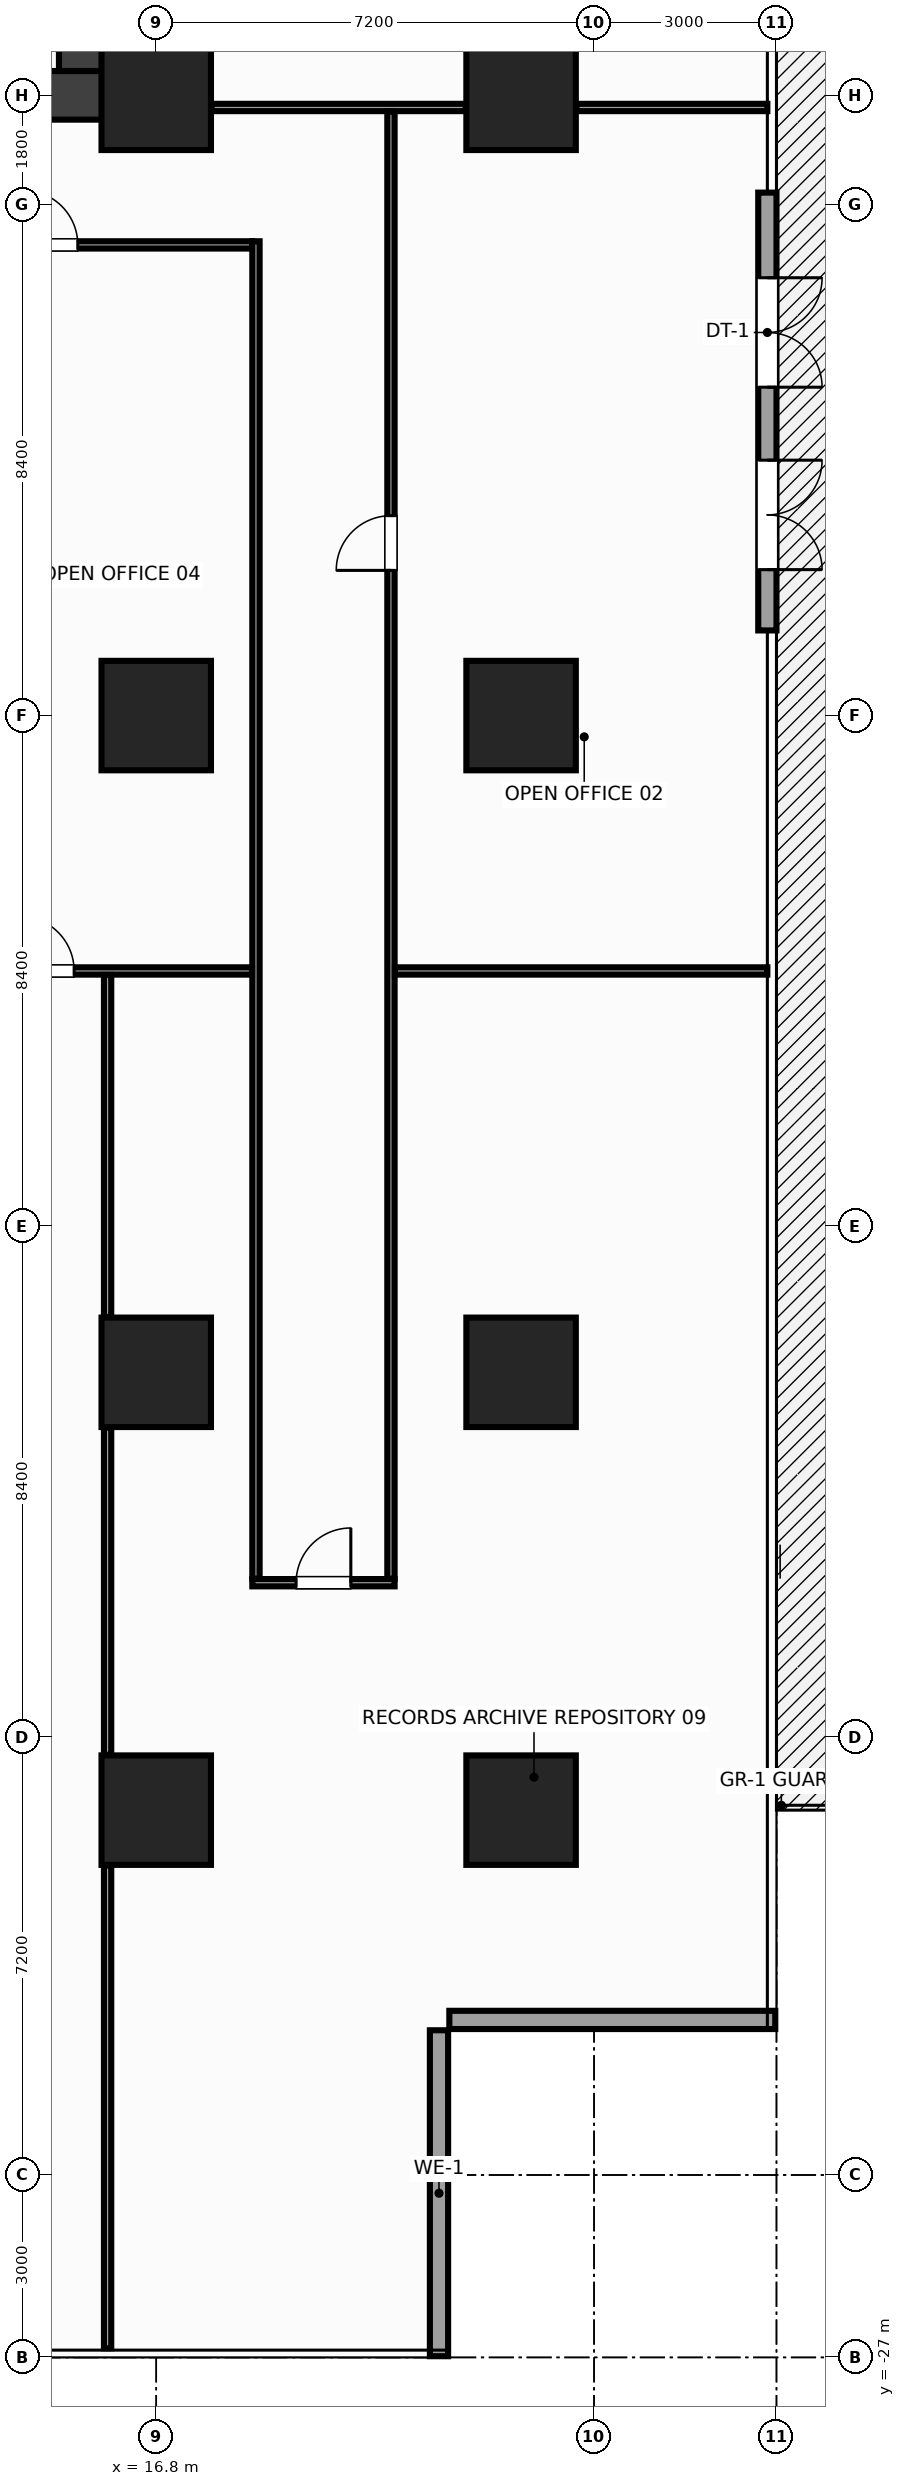
"""IFC4 building model, lengths in metres.
Left out: names, types, materials, properties, quantities, classifications, styles, units other than length and angle.
Written with IfcOpenShell. Run it as: python <this file> out.ifc"""

import sys

from ifc_helpers import new_model, si_unit, direction, frame, frame_2d, origin, origin_2d, place, context, subcontext, project, spatial, rectangle, extrude, source, transform, mapped, element, fill, save


model = new_model("IFC4")
c1 = context("Model", 3, precision=1e-05, world=origin(), true_north=direction((0.0, 1.0)))
c2 = subcontext(c1, "Body", "Model", "MODEL_VIEW")
j1 = project(units=[si_unit("LENGTHUNIT", "METRE"), si_unit("PLANEANGLEUNIT", "RADIAN")], contexts=[c1])
p1 = place(None, origin())
s1 = spatial("IfcSite", under=j1, at=p1, CompositionType="ELEMENT")
p2 = place(p1, origin())
s2 = spatial("IfcBuilding", under=s1, at=p2, CompositionType="ELEMENT")
p3 = place(p2, frame((0.0, 0.0, 23.6)))
s3 = spatial("IfcBuildingStorey", under=s2, at=p3, CompositionType="ELEMENT", Elevation=23.6)
m1 = source(origin(), c2, "Body", "SweptSolid", [
    extrude(rectangle(XDim=32.0, YDim=0.8, at=frame_2d((16.0, 0.0))), origin(), (0.0, 0.0, 1.0), 3.6),
])
p4 = place(p3, frame((-16.0, 10.2, 0.0), z_axis=(0.0, 0.0, 1.0), x_axis=(1.0, 0.0, 0.0)))
e1 = element("IfcWall", 1, at=p4, inside=s3, PredefinedType="SHEAR", context=c2, shape_type="MappedRepresentation", body=[
    mapped(m1, transform((0.0, 0.0, 0.0), x_axis=(1.0, 0.0, 0.0), y_axis=(0.0, 1.0, 0.0), z_axis=(0.0, 0.0, 1.0), scale=1.0)),
])
p5 = place(p4, frame((1.85, 0.0, 0.0)))
e2 = element("IfcOpeningElement", 2, at=p5, cuts=e1, PredefinedType="OPENING", context=c2, shape_type="SweptSolid", body=[
    extrude(rectangle(XDim=1.6, YDim=2.15, at=frame_2d((0.8, 1.075))), frame((0.0, 0.412, 0.0), z_axis=(0.0, -1.0, 0.0), x_axis=(1.0, 0.0, 0.0)), (0.0, 0.0, 1.0), 0.824),
])
p6 = place(p4, frame((28.55, 0.0, 0.0)))
e3 = element("IfcOpeningElement", 3, at=p6, cuts=e1, PredefinedType="OPENING", context=c2, shape_type="SweptSolid", body=[
    extrude(rectangle(XDim=1.6, YDim=2.15, at=frame_2d((0.8, 1.075))), frame((0.0, 0.412, 0.0), z_axis=(0.0, -1.0, 0.0), x_axis=(1.0, 0.0, 0.0)), (0.0, 0.0, 1.0), 0.824),
])
p7 = place(p4, frame((15.25, 0.0, 0.0)))
e4 = element("IfcOpeningElement", 4, at=p7, cuts=e1, PredefinedType="OPENING", context=c2, shape_type="SweptSolid", body=[
    extrude(rectangle(XDim=1.5, YDim=2.2, at=frame_2d((0.75, 1.1))), frame((0.0, 0.412, 0.0), z_axis=(0.0, -1.0, 0.0), x_axis=(1.0, 0.0, 0.0)), (0.0, 0.0, 1.0), 0.824),
])
m2 = source(origin(), c2, "Body", "SweptSolid", [
    extrude(rectangle(XDim=12.8, YDim=0.8, at=frame_2d((6.4, 0.0))), origin(), (0.0, 0.0, 1.0), 3.6),
])
p8 = place(p3, frame((15.6, 10.6, 0.0), z_axis=(0.0, 0.0, 1.0), x_axis=(0.0, 1.0, 0.0)))
e5 = element("IfcWall", 5, at=p8, inside=s3, PredefinedType="SHEAR", context=c2, shape_type="MappedRepresentation", body=[
    mapped(m2, transform((0.0, 0.0, 0.0), x_axis=(1.0, 0.0, 0.0), y_axis=(0.0, 1.0, 0.0), z_axis=(0.0, 0.0, 1.0), scale=1.0)),
])
m3 = source(origin(), c2, "Body", "SweptSolid", [
    extrude(rectangle(XDim=1.8, YDim=1.8, at=origin_2d()), origin(), (0.0, 0.0, 1.0), 3.6),
])
for number, where, z_axis, x_axis in (
    (6, (16.8, -18.0, 0.0), (0.0, 0.0, 1.0), (1.0, 0.0, 0.0)),
    (7, (16.8, -10.8, 0.0), (0.0, 0.0, 1.0), (1.0, 0.0, 0.0)),
    (8, (16.8, 0.0, 0.0), (0.0, 0.0, 1.0), (1.0, 0.0, 0.0)),
    (9, (16.8, 10.2, 0.0), (0.0, 0.0, 1.0), (1.0, 0.0, 0.0)),
    (10, (22.8, -18.0, 0.0), (0.0, 0.0, 1.0), (1.0, 0.0, 0.0)),
    (11, (22.8, -10.8, 0.0), (0.0, 0.0, 1.0), (1.0, 0.0, 0.0)),
    (12, (22.8, 0.0, 0.0), (0.0, 0.0, 1.0), (1.0, 0.0, 0.0)),
    (13, (22.8, 10.2, 0.0), (0.0, 0.0, 1.0), (1.0, 0.0, 0.0)),
):
    element("IfcColumn", number, at=place(p3, frame(where, z_axis=z_axis, x_axis=x_axis)), inside=s3, PredefinedType="COLUMN", context=c2, shape_type="MappedRepresentation", body=[
        mapped(m3, transform((0.0, 0.0, 0.0), x_axis=(1.0, 0.0, 0.0), y_axis=(0.0, 1.0, 0.0), z_axis=(0.0, 0.0, 1.0), scale=1.0)),
    ])
m4 = source(origin(), c2, "Body", "SweptSolid", [
    extrude(rectangle(XDim=5.36, YDim=0.3, at=frame_2d((2.68, 0.0))), origin(), (0.0, 0.0, 1.0), 2.74),
])
for number, where, z_axis, x_axis in (
    (14, (21.45, -26.98, 0.0), (0.0, 0.0, 1.0), (0.0, 1.0, 0.0)),
    (15, (21.62, -21.45, 0.0), (0.0, 0.0, 1.0), (1.0, 0.0, 0.0)),
):
    element("IfcWall", number, at=place(p3, frame(where, z_axis=z_axis, x_axis=x_axis)), inside=s3, PredefinedType="STANDARD", context=c2, shape_type="MappedRepresentation", body=[
        mapped(m4, transform((0.0, 0.0, 0.0), x_axis=(1.0, 0.0, 0.0), y_axis=(0.0, 1.0, 0.0), z_axis=(0.0, 0.0, 1.0), scale=1.0)),
    ])
m5 = source(origin(), c2, "Body", "SweptSolid", [
    extrude(rectangle(XDim=7.2, YDim=0.3, at=frame_2d((3.6, 0.0))), origin(), (0.0, 0.0, 1.0), 2.74),
])
p9 = place(p3, frame((26.85, 8.6, 0.0), z_axis=(0.0, 0.0, 1.0), x_axis=(0.0, -1.0, 0.0)))
e16 = element("IfcWall", 16, at=p9, inside=s3, PredefinedType="STANDARD", context=c2, shape_type="MappedRepresentation", body=[
    mapped(m5, transform((0.0, 0.0, 0.0), x_axis=(1.0, 0.0, 0.0), y_axis=(0.0, 1.0, 0.0), z_axis=(0.0, 0.0, 1.0), scale=1.0)),
])
p10 = place(p9, frame((1.4, 0.0, 0.0)))
e17 = element("IfcOpeningElement", 17, at=p10, cuts=e16, PredefinedType="OPENING", context=c2, shape_type="SweptSolid", body=[
    extrude(rectangle(XDim=1.8, YDim=2.2, at=frame_2d((0.9, 1.1))), frame((0.0, 0.162, 0.0), z_axis=(0.0, -1.0, 0.0), x_axis=(1.0, 0.0, 0.0)), (0.0, 0.0, 1.0), 0.324),
])
p11 = place(p9, frame((4.4, 0.0, 0.0)))
e18 = element("IfcOpeningElement", 18, at=p11, cuts=e16, PredefinedType="OPENING", context=c2, shape_type="SweptSolid", body=[
    extrude(rectangle(XDim=1.8, YDim=2.2, at=frame_2d((0.9, 1.1))), frame((0.0, 0.162, 0.0), z_axis=(0.0, -1.0, 0.0), x_axis=(1.0, 0.0, 0.0)), (0.0, 0.0, 1.0), 0.324),
])
m6 = source(origin(), c2, "Body", "SweptSolid", [
    extrude(rectangle(XDim=4.18, YDim=0.12, at=frame_2d((2.09, 0.0))), origin(), (0.0, 0.0, 1.0), 2.745),
])
p12 = place(p3, frame((17.71, 10.0, 0.0), z_axis=(0.0, 0.0, 1.0), x_axis=(1.0, 0.0, 0.0)))
e19 = element("IfcWall", 19, at=p12, inside=s3, PredefinedType="PARTITIONING", context=c2, shape_type="MappedRepresentation", body=[
    mapped(m6, transform((0.0, 0.0, 0.0), x_axis=(1.0, 0.0, 0.0), y_axis=(0.0, 1.0, 0.0), z_axis=(0.0, 0.0, 1.0), scale=1.0)),
])
m7 = source(origin(), c2, "Body", "SweptSolid", [
    extrude(rectangle(XDim=3.14, YDim=0.12, at=frame_2d((1.57, 0.0))), origin(), (0.0, 0.0, 1.0), 2.435),
])
p13 = place(p3, frame((23.71, 10.0, 0.0), z_axis=(0.0, 0.0, 1.0), x_axis=(1.0, 0.0, 0.0)))
e20 = element("IfcWall", 20, at=p13, inside=s3, PredefinedType="PARTITIONING", context=c2, shape_type="MappedRepresentation", body=[
    mapped(m7, transform((0.0, 0.0, 0.0), x_axis=(1.0, 0.0, 0.0), y_axis=(0.0, 1.0, 0.0), z_axis=(0.0, 0.0, 1.0), scale=1.0)),
])
m8 = source(origin(), c2, "Body", "SweptSolid", [
    extrude(rectangle(XDim=36.76, YDim=0.12, at=frame_2d((18.38, 0.0))), origin(), (0.0, 0.0, 1.0), 2.745),
])
p14 = place(p3, frame((-18.38, 7.74, 0.0), z_axis=(0.0, 0.0, 1.0), x_axis=(1.0, 0.0, 0.0)))
e21 = element("IfcWall", 21, at=p14, inside=s3, PredefinedType="PARTITIONING", context=c2, shape_type="MappedRepresentation", body=[
    mapped(m8, transform((0.0, 0.0, 0.0), x_axis=(1.0, 0.0, 0.0), y_axis=(0.0, 1.0, 0.0), z_axis=(0.0, 0.0, 1.0), scale=1.0)),
])
p15 = place(p14, frame((2.79, 0.0, 0.0)))
e22 = element("IfcOpeningElement", 22, at=p15, cuts=e21, PredefinedType="OPENING", context=c2, shape_type="SweptSolid", body=[
    extrude(rectangle(XDim=0.9, YDim=2.15, at=frame_2d((0.45, 1.075))), frame((0.0, 0.072, 0.0), z_axis=(0.0, -1.0, 0.0), x_axis=(1.0, 0.0, 0.0)), (0.0, 0.0, 1.0), 0.144),
])
p16 = place(p14, frame((32.99, 0.0, 0.0)))
e23 = element("IfcOpeningElement", 23, at=p16, cuts=e21, PredefinedType="OPENING", context=c2, shape_type="SweptSolid", body=[
    extrude(rectangle(XDim=0.9, YDim=2.15, at=frame_2d((0.45, 1.075))), frame((0.0, 0.072, 0.0), z_axis=(0.0, -1.0, 0.0), x_axis=(1.0, 0.0, 0.0)), (0.0, 0.0, 1.0), 0.144),
])
p17 = place(p14, frame((9.93, 0.0, 0.0)))
e24 = element("IfcOpeningElement", 24, at=p17, cuts=e21, PredefinedType="OPENING", context=c2, shape_type="SweptSolid", body=[
    extrude(rectangle(XDim=0.9, YDim=2.15, at=frame_2d((0.45, 1.075))), frame((0.0, 0.072, 0.0), z_axis=(0.0, -1.0, 0.0), x_axis=(1.0, 0.0, 0.0)), (0.0, 0.0, 1.0), 0.144),
])
p18 = place(p14, frame((18.23, 0.0, 0.0)))
e25 = element("IfcOpeningElement", 25, at=p18, cuts=e21, PredefinedType="OPENING", context=c2, shape_type="SweptSolid", body=[
    extrude(rectangle(XDim=0.9, YDim=2.15, at=frame_2d((0.45, 1.075))), frame((0.0, 0.072, 0.0), z_axis=(0.0, -1.0, 0.0), x_axis=(1.0, 0.0, 0.0)), (0.0, 0.0, 1.0), 0.144),
])
p19 = place(p14, frame((27.03, 0.0, 0.0)))
e26 = element("IfcOpeningElement", 26, at=p19, cuts=e21, PredefinedType="OPENING", context=c2, shape_type="SweptSolid", body=[
    extrude(rectangle(XDim=0.9, YDim=2.15, at=frame_2d((0.45, 1.075))), frame((0.0, 0.072, 0.0), z_axis=(0.0, -1.0, 0.0), x_axis=(1.0, 0.0, 0.0)), (0.0, 0.0, 1.0), 0.144),
])
m9 = source(origin(), c2, "Body", "SweptSolid", [
    extrude(rectangle(XDim=2.34, YDim=0.12, at=frame_2d((1.17, 0.0))), origin(), (0.0, 0.0, 1.0), 2.895),
])
p20 = place(p3, frame((18.38, -14.26, 0.0), z_axis=(0.0, 0.0, 1.0), x_axis=(1.0, 0.0, 0.0)))
e27 = element("IfcWall", 27, at=p20, inside=s3, PredefinedType="PARTITIONING", context=c2, shape_type="MappedRepresentation", body=[
    mapped(m9, transform((0.0, 0.0, 0.0), x_axis=(1.0, 0.0, 0.0), y_axis=(0.0, 1.0, 0.0), z_axis=(0.0, 0.0, 1.0), scale=1.0)),
])
p21 = place(p20, frame((0.72, 0.0, 0.0)))
e28 = element("IfcOpeningElement", 28, at=p21, cuts=e27, PredefinedType="OPENING", context=c2, shape_type="SweptSolid", body=[
    extrude(rectangle(XDim=0.9, YDim=2.15, at=frame_2d((0.45, 1.075))), frame((0.0, 0.072, 0.0), z_axis=(0.0, -1.0, 0.0), x_axis=(1.0, 0.0, 0.0)), (0.0, 0.0, 1.0), 0.144),
])
m10 = source(origin(), c2, "Body", "SweptSolid", [
    extrude(rectangle(XDim=21.995, YDim=0.12, at=frame_2d((10.998, 0.0))), origin(), (0.0, 0.0, 1.0), 2.745),
])
p22 = place(p3, frame((18.44, -14.195, 0.0), z_axis=(0.0, 0.0, 1.0), x_axis=(0.0, 1.0, 0.0)))
e29 = element("IfcWall", 29, at=p22, inside=s3, PredefinedType="PARTITIONING", context=c2, shape_type="MappedRepresentation", body=[
    mapped(m10, transform((0.0, 0.0, 0.0), x_axis=(1.0, 0.0, 0.0), y_axis=(0.0, 1.0, 0.0), z_axis=(0.0, 0.0, 1.0), scale=1.0)),
])
m11 = source(origin(), c2, "Body", "SweptSolid", [
    extrude(rectangle(XDim=24.13, YDim=0.12, at=frame_2d((12.065, 0.0))), origin(), (0.0, 0.0, 1.0), 2.745),
])
p23 = place(p3, frame((20.66, -14.195, 0.0), z_axis=(0.0, 0.0, 1.0), x_axis=(0.0, 1.0, 0.0)))
e30 = element("IfcWall", 30, at=p23, inside=s3, PredefinedType="PARTITIONING", context=c2, shape_type="MappedRepresentation", body=[
    mapped(m11, transform((0.0, 0.0, 0.0), x_axis=(1.0, 0.0, 0.0), y_axis=(0.0, 1.0, 0.0), z_axis=(0.0, 0.0, 1.0), scale=1.0)),
])
p24 = place(p23, frame((16.583, 0.0, 0.0)))
e31 = element("IfcOpeningElement", 31, at=p24, cuts=e30, PredefinedType="OPENING", context=c2, shape_type="SweptSolid", body=[
    extrude(rectangle(XDim=0.9, YDim=2.15, at=frame_2d((0.45, 1.075))), frame((0.0, 0.072, 0.0), z_axis=(0.0, -1.0, 0.0), x_axis=(1.0, 0.0, 0.0)), (0.0, 0.0, 1.0), 0.144),
])
m12 = source(origin(), c2, "Body", "SweptSolid", [
    extrude(rectangle(XDim=36.75, YDim=0.12, at=frame_2d((18.375, 0.0))), origin(), (0.0, 0.0, 1.0), 2.745),
])
p25 = place(p3, frame((-18.375, -4.2, 0.0), z_axis=(0.0, 0.0, 1.0), x_axis=(1.0, 0.0, 0.0)))
e32 = element("IfcWall", 32, at=p25, inside=s3, PredefinedType="PARTITIONING", context=c2, shape_type="MappedRepresentation", body=[
    mapped(m12, transform((0.0, 0.0, 0.0), x_axis=(1.0, 0.0, 0.0), y_axis=(0.0, 1.0, 0.0), z_axis=(0.0, 0.0, 1.0), scale=1.0)),
])
p26 = place(p25, frame((3.725, 0.0, 0.0)))
e33 = element("IfcOpeningElement", 33, at=p26, cuts=e32, PredefinedType="OPENING", context=c2, shape_type="SweptSolid", body=[
    extrude(rectangle(XDim=0.9, YDim=2.15, at=frame_2d((0.45, 1.075))), frame((0.0, 0.072, 0.0), z_axis=(0.0, -1.0, 0.0), x_axis=(1.0, 0.0, 0.0)), (0.0, 0.0, 1.0), 0.144),
])
p27 = place(p25, frame((18.225, 0.0, 0.0)))
e34 = element("IfcOpeningElement", 34, at=p27, cuts=e32, PredefinedType="OPENING", context=c2, shape_type="SweptSolid", body=[
    extrude(rectangle(XDim=0.9, YDim=2.15, at=frame_2d((0.45, 1.075))), frame((0.0, 0.072, 0.0), z_axis=(0.0, -1.0, 0.0), x_axis=(1.0, 0.0, 0.0)), (0.0, 0.0, 1.0), 0.144),
])
p28 = place(p25, frame((32.925, 0.0, 0.0)))
e35 = element("IfcOpeningElement", 35, at=p28, cuts=e32, PredefinedType="OPENING", context=c2, shape_type="SweptSolid", body=[
    extrude(rectangle(XDim=0.9, YDim=2.15, at=frame_2d((0.45, 1.075))), frame((0.0, 0.072, 0.0), z_axis=(0.0, -1.0, 0.0), x_axis=(1.0, 0.0, 0.0)), (0.0, 0.0, 1.0), 0.144),
])
m13 = source(origin(), c2, "Body", "SweptSolid", [
    extrude(rectangle(XDim=6.125, YDim=0.12, at=frame_2d((3.062, 0.0))), origin(), (0.0, 0.0, 1.0), 2.745),
])
p29 = place(p3, frame((20.725, -4.2, 0.0), z_axis=(0.0, 0.0, 1.0), x_axis=(1.0, 0.0, 0.0)))
e36 = element("IfcWall", 36, at=p29, inside=s3, PredefinedType="PARTITIONING", context=c2, shape_type="MappedRepresentation", body=[
    mapped(m13, transform((0.0, 0.0, 0.0), x_axis=(1.0, 0.0, 0.0), y_axis=(0.0, 1.0, 0.0), z_axis=(0.0, 0.0, 1.0), scale=1.0)),
])
m14 = source(origin(), c2, "Body", "SweptSolid", [
    extrude(rectangle(XDim=7.94, YDim=0.12, at=frame_2d((3.97, 0.0))), origin(), (0.0, 0.0, 1.0), 3.36),
])
p30 = place(p3, frame((16.0, -26.85, 0.0), z_axis=(0.0, 0.0, 1.0), x_axis=(0.0, 1.0, 0.0)))
e37 = element("IfcWall", 37, at=p30, inside=s3, PredefinedType="PARTITIONING", context=c2, shape_type="MappedRepresentation", body=[
    mapped(m14, transform((0.0, 0.0, 0.0), x_axis=(1.0, 0.0, 0.0), y_axis=(0.0, 1.0, 0.0), z_axis=(0.0, 0.0, 1.0), scale=1.0)),
])
m15 = source(origin(), c2, "Body", "SweptSolid", [
    extrude(rectangle(XDim=5.38, YDim=0.12, at=frame_2d((2.69, 0.0))), origin(), (0.0, 0.0, 1.0), 3.36),
])
p31 = place(p3, frame((16.0, -17.09, 0.0), z_axis=(0.0, 0.0, 1.0), x_axis=(0.0, 1.0, 0.0)))
e38 = element("IfcWall", 38, at=p31, inside=s3, PredefinedType="PARTITIONING", context=c2, shape_type="MappedRepresentation", body=[
    mapped(m15, transform((0.0, 0.0, 0.0), x_axis=(1.0, 0.0, 0.0), y_axis=(0.0, 1.0, 0.0), z_axis=(0.0, 0.0, 1.0), scale=1.0)),
])
m16 = source(origin(), c2, "Body", "SweptSolid", [
    extrude(rectangle(XDim=5.625, YDim=0.12, at=frame_2d((2.812, 0.0))), origin(), (0.0, 0.0, 1.0), 3.36),
])
p32 = place(p3, frame((16.0, -9.89, 0.0), z_axis=(0.0, 0.0, 1.0), x_axis=(0.0, 1.0, 0.0)))
e39 = element("IfcWall", 39, at=p32, inside=s3, PredefinedType="PARTITIONING", context=c2, shape_type="MappedRepresentation", body=[
    mapped(m16, transform((0.0, 0.0, 0.0), x_axis=(1.0, 0.0, 0.0), y_axis=(0.0, 1.0, 0.0), z_axis=(0.0, 0.0, 1.0), scale=1.0)),
])
m17 = source(origin(), c2, "Body", "SweptSolid", [
    extrude(rectangle(XDim=1.8, YDim=2.2, at=frame_2d((0.9, 1.1))), frame((0.0, 0.025, 0.0), z_axis=(0.0, -1.0, 0.0), x_axis=(1.0, 0.0, 0.0)), (0.0, 0.0, 1.0), 0.05),
])
p33 = place(p10, origin())
e40 = element("IfcDoor", 40, at=p33, inside=s3, OperationType="DOUBLE_DOOR_SINGLE_SWING", PredefinedType="DOOR", context=c2, shape_type="MappedRepresentation", body=[
    mapped(m17, transform((0.0, 0.0, 0.0), x_axis=(1.0, 0.0, 0.0), y_axis=(0.0, 1.0, 0.0), z_axis=(0.0, 0.0, 1.0), scale=1.0)),
])
fill(e17, e40)
p34 = place(p11, origin())
e41 = element("IfcDoor", 41, at=p34, inside=s3, OperationType="DOUBLE_DOOR_SINGLE_SWING", PredefinedType="DOOR", context=c2, shape_type="MappedRepresentation", body=[
    mapped(m17, transform((0.0, 0.0, 0.0), x_axis=(1.0, 0.0, 0.0), y_axis=(0.0, 1.0, 0.0), z_axis=(0.0, 0.0, 1.0), scale=1.0)),
])
fill(e18, e41)
m18 = source(origin(), c2, "Body", "SweptSolid", [
    extrude(rectangle(XDim=0.9, YDim=2.15, at=frame_2d((0.45, 1.075))), frame((0.0, 0.025, 0.0), z_axis=(0.0, -1.0, 0.0), x_axis=(1.0, 0.0, 0.0)), (0.0, 0.0, 1.0), 0.05),
])
p35 = place(p24, origin())
e42 = element("IfcDoor", 42, at=p35, inside=s3, OperationType="SINGLE_SWING_LEFT", PredefinedType="DOOR", context=c2, shape_type="MappedRepresentation", body=[
    mapped(m18, transform((0.0, 0.0, 0.0), x_axis=(1.0, 0.0, 0.0), y_axis=(0.0, 1.0, 0.0), z_axis=(0.0, 0.0, 1.0), scale=1.0)),
])
fill(e31, e42)
p36 = place(p16, origin())
e43 = element("IfcDoor", 43, at=p36, inside=s3, OperationType="SINGLE_SWING_LEFT", PredefinedType="DOOR", context=c2, shape_type="MappedRepresentation", body=[
    mapped(m18, transform((0.0, 0.0, 0.0), x_axis=(1.0, 0.0, 0.0), y_axis=(0.0, 1.0, 0.0), z_axis=(0.0, 0.0, 1.0), scale=1.0)),
])
fill(e23, e43)
p37 = place(p21, origin())
e44 = element("IfcDoor", 44, at=p37, inside=s3, OperationType="SINGLE_SWING_RIGHT", PredefinedType="DOOR", context=c2, shape_type="MappedRepresentation", body=[
    mapped(m18, transform((0.0, 0.0, 0.0), x_axis=(1.0, 0.0, 0.0), y_axis=(0.0, 1.0, 0.0), z_axis=(0.0, 0.0, 1.0), scale=1.0)),
])
fill(e28, e44)
p38 = place(p28, origin())
e45 = element("IfcDoor", 45, at=p38, inside=s3, OperationType="SINGLE_SWING_LEFT", PredefinedType="DOOR", context=c2, shape_type="MappedRepresentation", body=[
    mapped(m18, transform((0.0, 0.0, 0.0), x_axis=(1.0, 0.0, 0.0), y_axis=(0.0, 1.0, 0.0), z_axis=(0.0, 0.0, 1.0), scale=1.0)),
])
fill(e35, e45)
save(model, sys.argv[1])
